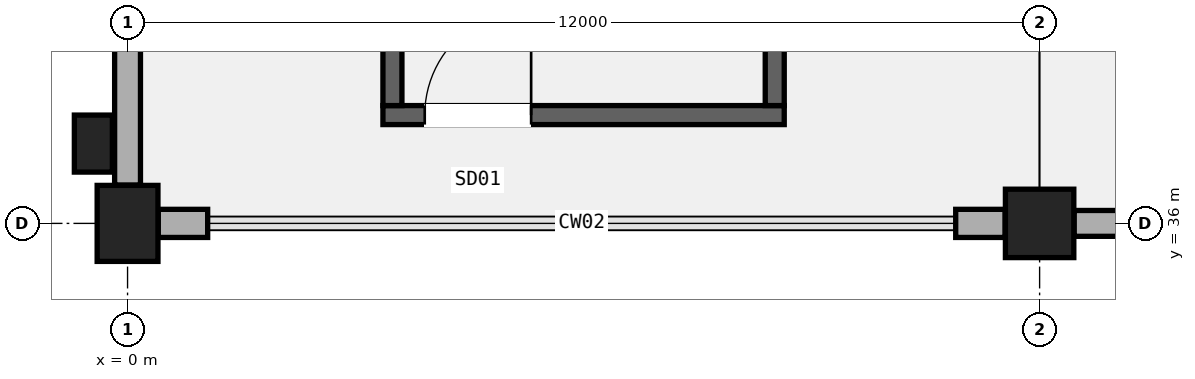
"""IFC4 building model, lengths in metres.
Left out: names, types, materials, properties, quantities, classifications, styles, units other than length and angle.
Written with IfcOpenShell. Run it as: python <this file> out.ifc"""

import sys

from ifc_helpers import new_model, si_unit, direction, frame, frame_2d, origin, origin_2d, place, context, subcontext, project, spatial, rectangle, extrude, element, fill, save


model = new_model("IFC4")
c1 = context("Model", 3, precision=1e-05, world=origin(), true_north=direction((0.0, 1.0)))
c2 = subcontext(c1, "Body", "Model", "MODEL_VIEW")
j1 = project(units=[si_unit("LENGTHUNIT", "METRE"), si_unit("PLANEANGLEUNIT", "RADIAN")], contexts=[c1])
p1 = place(None, origin())
s1 = spatial("IfcSite", under=j1, at=p1, CompositionType="ELEMENT")
p2 = place(p1, origin())
s2 = spatial("IfcBuilding", under=s1, at=p2, CompositionType="ELEMENT")
p3 = place(p2, frame((0.0, 0.0, 10.2)))
s3 = spatial("IfcBuildingStorey", under=s2, at=p3, CompositionType="ELEMENT", Elevation=10.2)
p4 = place(p3, frame((0.0, 36.0, 0.0), z_axis=(0.0, 0.0, 1.0), x_axis=(1.0, 0.0, 0.0)))
e1 = element("IfcColumn", 1, at=p4, inside=s3, PredefinedType="COLUMN", context=c2, shape_type="SweptSolid", body=[
    extrude(rectangle(XDim=0.8, YDim=1.0, at=origin_2d()), origin(), (0.0, 0.0, 1.0), 5.1),
])
p5 = place(p3, frame((12.0, 36.0, 0.0), z_axis=(0.0, 0.0, 1.0), x_axis=(1.0, 0.0, 0.0)))
e2 = element("IfcColumn", 2, at=p5, inside=s3, PredefinedType="COLUMN", context=c2, shape_type="SweptSolid", body=[
    extrude(rectangle(XDim=0.9, YDim=0.9, at=origin_2d()), origin(), (0.0, 0.0, 1.0), 5.1),
])
p6 = place(p3, frame((-0.45, 37.05, 0.0), z_axis=(0.0, 0.0, 1.0), x_axis=(1.0, 0.0, 0.0)))
e3 = element("IfcColumn", 3, at=p6, inside=s3, PredefinedType="PILASTER", context=c2, shape_type="SweptSolid", body=[
    extrude(rectangle(XDim=0.5, YDim=0.75, at=origin_2d()), origin(), (0.0, 0.0, 1.0), 5.1),
])
for number, where, z_axis, x_axis in (
    (4, (0.404, 36.0, 0.0), (0.0, 0.0, 1.0), (1.0, 0.0, 0.0)),
    (5, (10.896, 36.0, 0.0), (0.0, 0.0, 1.0), (1.0, 0.0, 0.0)),
):
    element("IfcWall", number, at=place(p3, frame(where, z_axis=z_axis, x_axis=x_axis)), inside=s3, PredefinedType="SOLIDWALL", context=c2, shape_type="SweptSolid", body=[
        extrude(rectangle(XDim=0.65, YDim=0.37, at=frame_2d((0.325, 0.0))), origin(), (0.0, 0.0, 1.0), 4.02),
    ])
p7 = place(p3, frame((0.0, 36.504, 0.0), z_axis=(0.0, 0.0, 1.0), x_axis=(0.0, 1.0, 0.0)))
e6 = element("IfcWall", 6, at=p7, inside=s3, PredefinedType="SOLIDWALL", context=c2, shape_type="SweptSolid", body=[
    extrude(rectangle(XDim=11.042, YDim=0.34, at=frame_2d((5.521, 0.0))), origin(), (0.0, 0.0, 1.0), 4.02),
])
p8 = place(p7, frame((2.75, 0.0, 0.95)))
e7 = element("IfcOpeningElement", 7, at=p8, cuts=e6, PredefinedType="OPENING", context=c2, shape_type="SweptSolid", body=[
    extrude(rectangle(XDim=3.15, YDim=1.9, at=frame_2d((1.575, 0.95))), frame((0.0, 0.18, 0.0), z_axis=(0.0, -1.0, 0.0), x_axis=(1.0, 0.0, 0.0)), (0.0, 0.0, 1.0), 0.36),
])
p9 = place(p3, frame((12.454, 36.0, 0.0), z_axis=(0.0, 0.0, 1.0), x_axis=(1.0, 0.0, 0.0)))
e8 = element("IfcWall", 8, at=p9, inside=s3, PredefinedType="SOLIDWALL", context=c2, shape_type="SweptSolid", body=[
    extrude(rectangle(XDim=11.142, YDim=0.34, at=frame_2d((5.571, 0.0))), origin(), (0.0, 0.0, 1.0), 4.12),
])
p10 = place(p9, frame((1.5, 0.0, 0.95)))
e9 = element("IfcOpeningElement", 9, at=p10, cuts=e8, PredefinedType="OPENING", context=c2, shape_type="SweptSolid", body=[
    extrude(rectangle(XDim=0.9, YDim=2.4, at=frame_2d((0.45, 1.2))), frame((0.0, 0.18, 0.0), z_axis=(0.0, -1.0, 0.0), x_axis=(1.0, 0.0, 0.0)), (0.0, 0.0, 1.0), 0.36),
])
p11 = place(p3, frame((3.36, 37.425, 0.0), z_axis=(0.0, 0.0, 1.0), x_axis=(1.0, 0.0, 0.0)))
e10 = element("IfcWall", 10, at=p11, inside=s3, PredefinedType="SHEAR", context=c2, shape_type="SweptSolid", body=[
    extrude(rectangle(XDim=5.28, YDim=0.25, at=frame_2d((2.64, 0.0))), origin(), (0.0, 0.0, 1.0), 4.82),
])
p12 = place(p11, frame((0.55, 0.0, 0.0)))
e11 = element("IfcOpeningElement", 11, at=p12, cuts=e10, PredefinedType="OPENING", context=c2, shape_type="SweptSolid", body=[
    extrude(rectangle(XDim=1.4, YDim=2.15, at=frame_2d((0.7, 1.075))), frame((0.0, 0.135, 0.0), z_axis=(0.0, -1.0, 0.0), x_axis=(1.0, 0.0, 0.0)), (0.0, 0.0, 1.0), 0.27),
])
for number, where, z_axis, x_axis in (
    (12, (3.485, 37.55, 0.0), (0.0, 0.0, 1.0), (0.0, 1.0, 0.0)),
    (13, (8.515, 37.55, 0.0), (0.0, 0.0, 1.0), (0.0, 1.0, 0.0)),
):
    element("IfcWall", number, at=place(p3, frame(where, z_axis=z_axis, x_axis=x_axis)), inside=s3, PredefinedType="SHEAR", context=c2, shape_type="SweptSolid", body=[
        extrude(rectangle(XDim=8.9, YDim=0.25, at=frame_2d((4.45, 0.0))), origin(), (0.0, 0.0, 1.0), 4.82),
    ])
p13 = place(p12, origin())
e14 = element("IfcDoor", 14, at=p13, inside=s3, OperationType="SINGLE_SWING_RIGHT", PredefinedType="DOOR", context=c2, shape_type="SweptSolid", body=[
    extrude(rectangle(XDim=1.4, YDim=2.15, at=frame_2d((0.7, 1.075))), frame((0.0, 0.025, 0.0), z_axis=(0.0, -1.0, 0.0), x_axis=(1.0, 0.0, 0.0)), (0.0, 0.0, 1.0), 0.05),
])
fill(e11, e14)
save(model, sys.argv[1])
